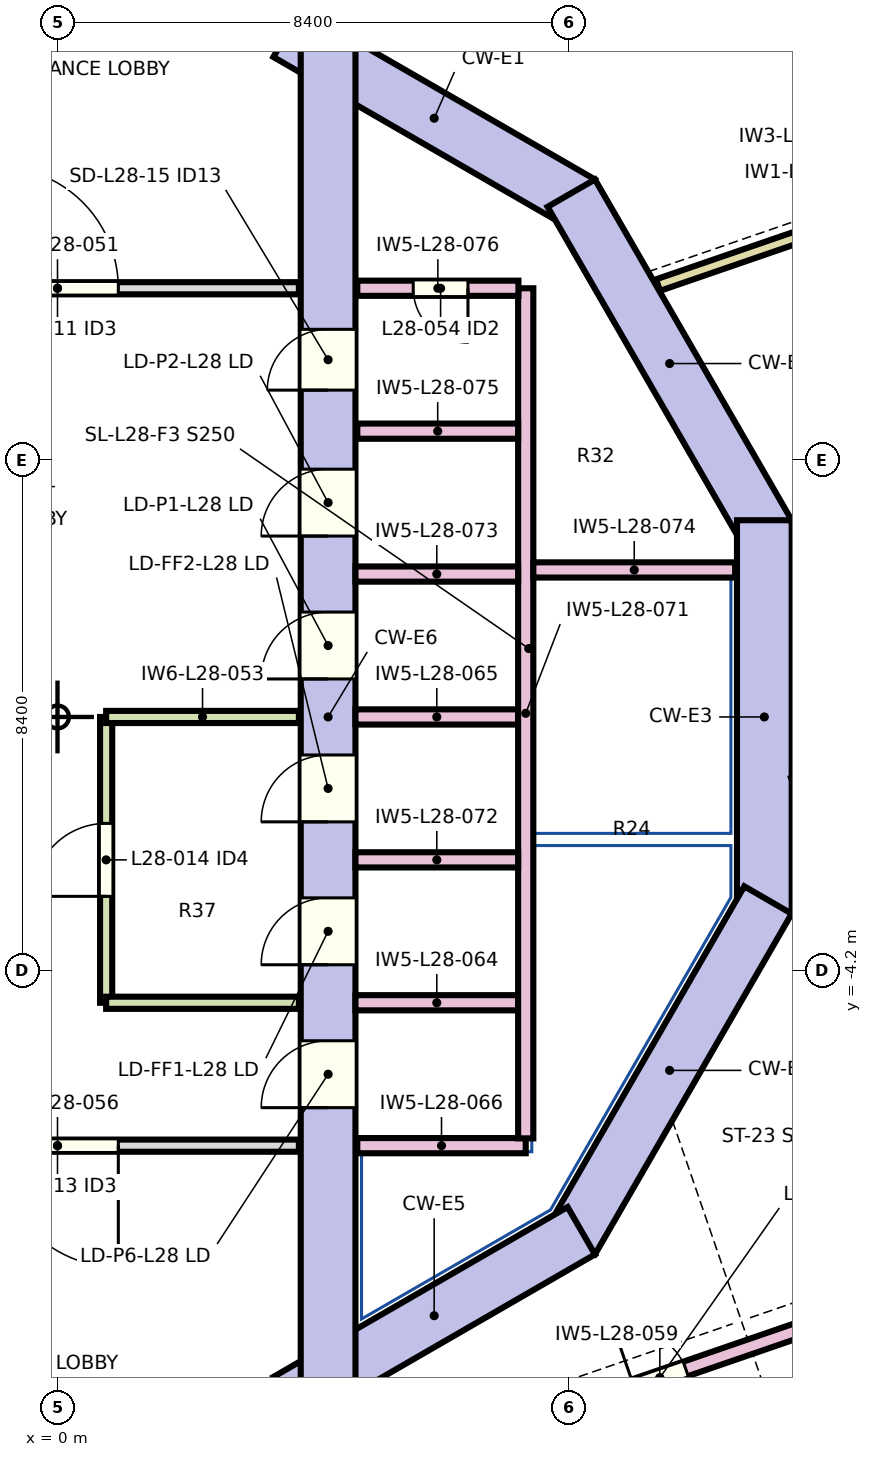
"""IFC4 building model, lengths in metres.
Left out: names, types, materials, properties, quantities, classifications, styles, units other than length and angle.
Written with IfcOpenShell. Run it as: python <this file> out.ifc"""

import sys

from ifc_helpers import new_model, si_unit, direction, frame, frame_2d, origin, place, context, subcontext, project, spatial, rectangle, extrude, element, fill, save


model = new_model("IFC4")
c1 = context("Model", 3, precision=1e-05, world=origin(), true_north=direction((0.0, 1.0)))
c2 = subcontext(c1, "Body", "Model", "MODEL_VIEW")
j1 = project(units=[si_unit("LENGTHUNIT", "METRE"), si_unit("PLANEANGLEUNIT", "RADIAN")], contexts=[c1])
p1 = place(None, origin())
s1 = spatial("IfcSite", under=j1, at=p1, CompositionType="ELEMENT")
p2 = place(p1, origin())
s2 = spatial("IfcBuilding", under=s1, at=p2, CompositionType="ELEMENT")
p3 = place(p2, frame((0.0, 0.0, 134.5)))
s3 = spatial("IfcBuildingStorey", under=s2, at=p3, CompositionType="ELEMENT", Elevation=134.5)
p4 = place(p3, frame((3.775, 11.243, 0.0), z_axis=(0.0, 0.0, 1.0), x_axis=(0.866026961591, -0.49999730179, 0.0)))
e1 = element("IfcWall", 1, at=p4, inside=s3, PredefinedType="SHEAR", context=c2, shape_type="SweptSolid", body=[
    extrude(rectangle(XDim=5.587, YDim=0.9, at=frame_2d((2.794, 0.0))), origin(), (0.0, 0.0, 1.0), 3.8),
])
p5 = place(p3, frame((8.449, 8.614, 0.0), z_axis=(0.0, 0.0, 1.0), x_axis=(0.499990282633, -0.866031014036, 0.0)))
e2 = element("IfcWall", 2, at=p5, inside=s3, PredefinedType="SHEAR", context=c2, shape_type="SweptSolid", body=[
    extrude(rectangle(XDim=6.47, YDim=0.9, at=frame_2d((3.235, 0.0))), origin(), (0.0, 0.0, 1.0), 3.8),
])
p6 = place(p3, frame((11.624, 3.235, 0.0), z_axis=(0.0, 0.0, 1.0), x_axis=(0.0, -1.0, 0.0)))
e3 = element("IfcWall", 3, at=p6, inside=s3, PredefinedType="SHEAR", context=c2, shape_type="SweptSolid", body=[
    extrude(rectangle(XDim=6.471, YDim=0.9, at=frame_2d((3.235, 0.0))), origin(), (0.0, 0.0, 1.0), 3.8),
])
p7 = place(p3, frame((11.684, -3.01, 0.0), z_axis=(0.0, 0.0, 1.0), x_axis=(-0.499990282633, -0.866031014036, 0.0)))
e4 = element("IfcWall", 4, at=p7, inside=s3, PredefinedType="SHEAR", context=c2, shape_type="SweptSolid", body=[
    extrude(rectangle(XDim=6.47, YDim=0.9, at=frame_2d((3.235, 0.0))), origin(), (0.0, 0.0, 1.0), 3.8),
])
p8 = place(p3, frame((8.614, -8.449, 0.0), z_axis=(0.0, 0.0, 1.0), x_axis=(-0.866026961591, -0.49999730179, 0.0)))
e5 = element("IfcWall", 5, at=p8, inside=s3, PredefinedType="SHEAR", context=c2, shape_type="SweptSolid", body=[
    extrude(rectangle(XDim=5.587, YDim=0.9, at=frame_2d((2.794, 0.0))), origin(), (0.0, 0.0, 1.0), 3.8),
])
p9 = place(p3, frame((4.45, -11.633, 0.0), z_axis=(0.0, 0.0, 1.0), x_axis=(0.0, 1.0, 0.0)))
e6 = element("IfcWall", 6, at=p9, inside=s3, PredefinedType="SHEAR", context=c2, shape_type="SweptSolid", body=[
    extrude(rectangle(XDim=23.265, YDim=0.9, at=frame_2d((11.633, 0.0))), origin(), (0.0, 0.0, 1.0), 3.8),
])
p10 = place(p9, frame((7.558, 0.0, 0.0)))
e7 = element("IfcOpeningElement", 7, at=p10, cuts=e6, PredefinedType="OPENING", context=c2, shape_type="SweptSolid", body=[
    extrude(rectangle(XDim=1.1, YDim=2.1, at=frame_2d((0.55, 1.05))), frame((0.0, 0.46, 0.0), z_axis=(0.0, -1.0, 0.0), x_axis=(1.0, 0.0, 0.0)), (0.0, 0.0, 1.0), 0.92),
])
p11 = place(p9, frame((9.907, 0.0, 0.0)))
e8 = element("IfcOpeningElement", 8, at=p11, cuts=e6, PredefinedType="OPENING", context=c2, shape_type="SweptSolid", body=[
    extrude(rectangle(XDim=1.1, YDim=2.1, at=frame_2d((0.55, 1.05))), frame((0.0, 0.46, 0.0), z_axis=(0.0, -1.0, 0.0), x_axis=(1.0, 0.0, 0.0)), (0.0, 0.0, 1.0), 0.92),
])
p12 = place(p9, frame((12.258, 0.0, 0.0)))
e9 = element("IfcOpeningElement", 9, at=p12, cuts=e6, PredefinedType="OPENING", context=c2, shape_type="SweptSolid", body=[
    extrude(rectangle(XDim=1.1, YDim=2.1, at=frame_2d((0.55, 1.05))), frame((0.0, 0.46, 0.0), z_axis=(0.0, -1.0, 0.0), x_axis=(1.0, 0.0, 0.0)), (0.0, 0.0, 1.0), 0.92),
])
p13 = place(p9, frame((14.607, 0.0, 0.0)))
e10 = element("IfcOpeningElement", 10, at=p13, cuts=e6, PredefinedType="OPENING", context=c2, shape_type="SweptSolid", body=[
    extrude(rectangle(XDim=1.1, YDim=2.1, at=frame_2d((0.55, 1.05))), frame((0.0, 0.46, 0.0), z_axis=(0.0, -1.0, 0.0), x_axis=(1.0, 0.0, 0.0)), (0.0, 0.0, 1.0), 0.92),
])
p14 = place(p9, frame((5.208, 0.0, 0.0)))
e11 = element("IfcOpeningElement", 11, at=p14, cuts=e6, PredefinedType="OPENING", context=c2, shape_type="SweptSolid", body=[
    extrude(rectangle(XDim=1.1, YDim=2.1, at=frame_2d((0.55, 1.05))), frame((0.0, 0.46, 0.0), z_axis=(0.0, -1.0, 0.0), x_axis=(1.0, 0.0, 0.0)), (0.0, 0.0, 1.0), 0.92),
])
p15 = place(p9, frame((17.008, 0.0, 0.0)))
e12 = element("IfcOpeningElement", 12, at=p15, cuts=e6, PredefinedType="OPENING", context=c2, shape_type="SweptSolid", body=[
    extrude(rectangle(XDim=1.0, YDim=2.1, at=frame_2d((0.5, 1.05))), frame((0.0, 0.46, 0.0), z_axis=(0.0, -1.0, 0.0), x_axis=(1.0, 0.0, 0.0)), (0.0, 0.0, 1.0), 0.92),
])
p16 = place(p3, frame((-12.586, -20.515, 0.0), z_axis=(0.0, 0.0, 1.0), x_axis=(0.945519939336, 0.325564193852, 0.0)))
e13 = element("IfcWall", 13, at=p16, inside=s3, PredefinedType="PARTITIONING", context=c2, shape_type="SweptSolid", body=[
    extrude(rectangle(XDim=37.28, YDim=0.2, at=frame_2d((18.64, 0.0))), origin(), (0.0, 0.0, 1.0), 3.55),
])
p17 = place(p16, frame((9.83, 0.0, 0.0)))
e14 = element("IfcOpeningElement", 14, at=p17, cuts=e13, PredefinedType="OPENING", context=c2, shape_type="SweptSolid", body=[
    extrude(rectangle(XDim=1.0, YDim=2.1, at=frame_2d((0.5, 1.05))), frame((0.0, 0.11, 0.0), z_axis=(0.0, -1.0, 0.0), x_axis=(1.0, 0.0, 0.0)), (0.0, 0.0, 1.0), 0.22),
])
p18 = place(p16, frame((18.93, 0.0, 0.0)))
e15 = element("IfcOpeningElement", 15, at=p18, cuts=e13, PredefinedType="OPENING", context=c2, shape_type="SweptSolid", body=[
    extrude(rectangle(XDim=1.0, YDim=2.1, at=frame_2d((0.5, 1.05))), frame((0.0, 0.11, 0.0), z_axis=(0.0, -1.0, 0.0), x_axis=(1.0, 0.0, 0.0)), (0.0, 0.0, 1.0), 0.22),
])
p19 = place(p16, frame((30.28, 0.0, 0.0)))
e16 = element("IfcOpeningElement", 16, at=p19, cuts=e13, PredefinedType="OPENING", context=c2, shape_type="SweptSolid", body=[
    extrude(rectangle(XDim=1.0, YDim=2.1, at=frame_2d((0.5, 1.05))), frame((0.0, 0.11, 0.0), z_axis=(0.0, -1.0, 0.0), x_axis=(1.0, 0.0, 0.0)), (0.0, 0.0, 1.0), 0.22),
])
p20 = place(p16, frame((0.13, 0.0, 0.0)))
e17 = element("IfcOpeningElement", 17, at=p20, cuts=e13, PredefinedType="OPENING", context=c2, shape_type="SweptSolid", body=[
    extrude(rectangle(XDim=1.0, YDim=2.1, at=frame_2d((0.5, 1.05))), frame((0.0, 0.11, 0.0), z_axis=(0.0, -1.0, 0.0), x_axis=(1.0, 0.0, 0.0)), (0.0, 0.0, 1.0), 0.22),
])
p21 = place(p16, frame((34.23, 0.0, 0.0)))
e18 = element("IfcOpeningElement", 18, at=p21, cuts=e13, PredefinedType="OPENING", context=c2, shape_type="SweptSolid", body=[
    extrude(rectangle(XDim=1.1, YDim=2.1, at=frame_2d((0.55, 1.05))), frame((0.0, 0.11, 0.0), z_axis=(0.0, -1.0, 0.0), x_axis=(1.0, 0.0, 0.0)), (0.0, 0.0, 1.0), 0.22),
])
p22 = place(p3, frame((-3.97, 7.05, 0.0), z_axis=(0.0, 0.0, 1.0), x_axis=(1.0, 0.0, 0.0)))
e19 = element("IfcWall", 19, at=p22, inside=s3, PredefinedType="PARTITIONING", context=c2, shape_type="SweptSolid", body=[
    extrude(rectangle(XDim=7.94, YDim=0.2, at=frame_2d((3.97, 0.0))), origin(), (0.0, 0.0, 1.0), 3.55),
])
p23 = place(p22, frame((2.97, 0.0, 0.0)))
e20 = element("IfcOpeningElement", 20, at=p23, cuts=e19, PredefinedType="OPENING", context=c2, shape_type="SweptSolid", body=[
    extrude(rectangle(XDim=2.0, YDim=2.1, at=frame_2d((1.0, 1.05))), frame((0.0, 0.11, 0.0), z_axis=(0.0, -1.0, 0.0), x_axis=(1.0, 0.0, 0.0)), (0.0, 0.0, 1.0), 0.22),
])
p24 = place(p3, frame((0.8, -4.7, 0.0), z_axis=(0.0, 0.0, 1.0), x_axis=(0.0, 1.0, 0.0)))
e21 = element("IfcWall", 21, at=p24, inside=s3, PredefinedType="SOLIDWALL", context=c2, shape_type="SweptSolid", body=[
    extrude(rectangle(XDim=4.7, YDim=0.2, at=frame_2d((2.35, 0.0))), origin(), (0.0, 0.0, 1.0), 3.55),
])
p25 = place(p24, frame((1.75, 0.0, 0.0)))
e22 = element("IfcOpeningElement", 22, at=p25, cuts=e21, PredefinedType="OPENING", context=c2, shape_type="SweptSolid", body=[
    extrude(rectangle(XDim=1.2, YDim=2.1, at=frame_2d((0.6, 1.05))), frame((0.0, 0.11, 0.0), z_axis=(0.0, -1.0, 0.0), x_axis=(1.0, 0.0, 0.0)), (0.0, 0.0, 1.0), 0.22),
])
p26 = place(p3, frame((0.8, 0.0, 0.0), z_axis=(0.0, 0.0, 1.0), x_axis=(1.0, 0.0, 0.0)))
e23 = element("IfcWall", 23, at=p26, inside=s3, PredefinedType="SOLIDWALL", context=c2, shape_type="SweptSolid", body=[
    extrude(rectangle(XDim=3.17, YDim=0.2, at=frame_2d((1.585, 0.0))), origin(), (0.0, 0.0, 1.0), 3.55),
])
p27 = place(p3, frame((3.97, -7.05, 0.0), z_axis=(0.0, 0.0, 1.0), x_axis=(-1.0, 0.0, 0.0)))
e24 = element("IfcWall", 24, at=p27, inside=s3, PredefinedType="PARTITIONING", context=c2, shape_type="SweptSolid", body=[
    extrude(rectangle(XDim=7.94, YDim=0.2, at=frame_2d((3.97, 0.0))), origin(), (0.0, 0.0, 1.0), 3.55),
])
p28 = place(p27, frame((2.97, 0.0, 0.0)))
e25 = element("IfcOpeningElement", 25, at=p28, cuts=e24, PredefinedType="OPENING", context=c2, shape_type="SweptSolid", body=[
    extrude(rectangle(XDim=2.0, YDim=2.1, at=frame_2d((1.0, 1.05))), frame((0.0, 0.11, 0.0), z_axis=(0.0, -1.0, 0.0), x_axis=(1.0, 0.0, 0.0)), (0.0, 0.0, 1.0), 0.22),
])
p29 = place(p3, frame((3.97, -4.7, 0.0), z_axis=(0.0, 0.0, 1.0), x_axis=(-1.0, 0.0, 0.0)))
e26 = element("IfcWall", 26, at=p29, inside=s3, PredefinedType="SOLIDWALL", context=c2, shape_type="SweptSolid", body=[
    extrude(rectangle(XDim=3.17, YDim=0.2, at=frame_2d((1.585, 0.0))), origin(), (0.0, 0.0, 1.0), 3.55),
])
p30 = place(p3, frame((4.0, -12.901, 0.0), z_axis=(0.0, 0.0, 1.0), x_axis=(0.945515789626, 0.325576245398, 0.0)))
e27 = element("IfcWall", 27, at=p30, inside=s3, PredefinedType="SOLIDWALL", context=c2, shape_type="SweptSolid", body=[
    extrude(rectangle(XDim=12.491, YDim=0.25, at=frame_2d((6.246, 0.0))), origin(), (0.0, 0.0, 1.0), 3.55),
])
p31 = place(p30, frame((0.175, 0.0, 0.0)))
e28 = element("IfcOpeningElement", 28, at=p31, cuts=e27, PredefinedType="OPENING", context=c2, shape_type="SweptSolid", body=[
    extrude(rectangle(XDim=0.9, YDim=2.1, at=frame_2d((0.45, 1.05))), frame((0.0, 0.135, 0.0), z_axis=(0.0, -1.0, 0.0), x_axis=(1.0, 0.0, 0.0)), (0.0, 0.0, 1.0), 0.27),
])
p32 = place(p30, frame((5.796, 0.0, 0.0)))
e29 = element("IfcOpeningElement", 29, at=p32, cuts=e27, PredefinedType="OPENING", context=c2, shape_type="SweptSolid", body=[
    extrude(rectangle(XDim=0.9, YDim=2.1, at=frame_2d((0.45, 1.05))), frame((0.0, 0.135, 0.0), z_axis=(0.0, -1.0, 0.0), x_axis=(1.0, 0.0, 0.0)), (0.0, 0.0, 1.0), 0.27),
])
p33 = place(p3, frame((4.599, 15.862, 0.0), z_axis=(0.0, 0.0, 1.0), x_axis=(-0.94551912499, -0.325566558907, 0.0)))
e30 = element("IfcWall", 30, at=p33, inside=s3, PredefinedType="PARTITIONING", context=c2, shape_type="SweptSolid", body=[
    extrude(rectangle(XDim=26.293, YDim=0.2, at=frame_2d((13.146, 0.0))), origin(), (0.0, 0.0, 1.0), 3.55),
])
p34 = place(p33, frame((10.81, 0.0, 0.0)))
e31 = element("IfcOpeningElement", 31, at=p34, cuts=e30, PredefinedType="OPENING", context=c2, shape_type="SweptSolid", body=[
    extrude(rectangle(XDim=0.9, YDim=2.1, at=frame_2d((0.45, 1.05))), frame((0.0, 0.11, 0.0), z_axis=(0.0, -1.0, 0.0), x_axis=(1.0, 0.0, 0.0)), (0.0, 0.0, 1.0), 0.22),
])
p35 = place(p33, frame((3.865, 0.0, 0.0)))
e32 = element("IfcOpeningElement", 32, at=p35, cuts=e30, PredefinedType="OPENING", context=c2, shape_type="SweptSolid", body=[
    extrude(rectangle(XDim=2.0, YDim=2.1, at=frame_2d((1.0, 1.05))), frame((0.0, 0.11, 0.0), z_axis=(0.0, -1.0, 0.0), x_axis=(1.0, 0.0, 0.0)), (0.0, 0.0, 1.0), 0.22),
])
for number, where, z_axis, x_axis in (
    (33, (4.9, -4.7, 0.0), (0.0, 0.0, 1.0), (1.0, 0.0, 0.0)),
    (34, (4.9, 0.0, 0.0), (0.0, 0.0, 1.0), (1.0, 0.0, 0.0)),
):
    element("IfcWall", number, at=place(p3, frame(where, z_axis=z_axis, x_axis=x_axis)), inside=s3, PredefinedType="SOLIDWALL", context=c2, shape_type="SweptSolid", body=[
        extrude(rectangle(XDim=2.675, YDim=0.25, at=frame_2d((1.337, 0.0))), origin(), (0.0, 0.0, 1.0), 3.55),
    ])
p36 = place(p3, frame((4.93, -7.05, 0.0), z_axis=(0.0, 0.0, 1.0), x_axis=(1.0, 0.0, 0.0)))
e35 = element("IfcWall", 35, at=p36, inside=s3, PredefinedType="SOLIDWALL", context=c2, shape_type="SweptSolid", body=[
    extrude(rectangle(XDim=2.77, YDim=0.25, at=frame_2d((1.385, 0.0))), origin(), (0.0, 0.0, 1.0), 3.55),
])
p37 = place(p3, frame((7.7, -6.93, 0.0), z_axis=(0.0, 0.0, 1.0), x_axis=(0.0, 1.0, 0.0)))
e36 = element("IfcWall", 36, at=p37, inside=s3, PredefinedType="SOLIDWALL", context=c2, shape_type="SweptSolid", body=[
    extrude(rectangle(XDim=13.98, YDim=0.25, at=frame_2d((6.99, 0.0))), origin(), (0.0, 0.0, 1.0), 3.55),
])
for number, where, z_axis, x_axis in (
    (37, (7.575, -2.35, 0.0), (0.0, 0.0, 1.0), (-1.0, 0.0, 0.0)),
    (38, (7.575, 2.35, 0.0), (0.0, 0.0, 1.0), (-1.0, 0.0, 0.0)),
):
    element("IfcWall", number, at=place(p3, frame(where, z_axis=z_axis, x_axis=x_axis)), inside=s3, PredefinedType="SOLIDWALL", context=c2, shape_type="SweptSolid", body=[
        extrude(rectangle(XDim=2.675, YDim=0.25, at=frame_2d((1.337, 0.0))), origin(), (0.0, 0.0, 1.0), 3.55),
    ])
p38 = place(p3, frame((7.825, 2.418, 0.0), z_axis=(0.0, 0.0, 1.0), x_axis=(1.0, 0.0, 0.0)))
e39 = element("IfcWall", 39, at=p38, inside=s3, PredefinedType="SOLIDWALL", context=c2, shape_type="SweptSolid", body=[
    extrude(rectangle(XDim=3.319, YDim=0.25, at=frame_2d((1.66, 0.0))), origin(), (0.0, 0.0, 1.0), 3.55),
])
p39 = place(p3, frame((7.575, 4.7, 0.0), z_axis=(0.0, 0.0, 1.0), x_axis=(-1.0, 0.0, 0.0)))
e40 = element("IfcWall", 40, at=p39, inside=s3, PredefinedType="SOLIDWALL", context=c2, shape_type="SweptSolid", body=[
    extrude(rectangle(XDim=2.645, YDim=0.25, at=frame_2d((1.323, 0.0))), origin(), (0.0, 0.0, 1.0), 3.55),
])
p40 = place(p3, frame((7.58, 7.05, 0.0), z_axis=(0.0, 0.0, 1.0), x_axis=(-1.0, 0.0, 0.0)))
e41 = element("IfcWall", 41, at=p40, inside=s3, PredefinedType="SOLIDWALL", context=c2, shape_type="SweptSolid", body=[
    extrude(rectangle(XDim=2.65, YDim=0.25, at=frame_2d((1.325, 0.0))), origin(), (0.0, 0.0, 1.0), 3.55),
])
p41 = place(p40, frame((0.83, 0.0, 0.0)))
e42 = element("IfcOpeningElement", 42, at=p41, cuts=e41, PredefinedType="OPENING", context=c2, shape_type="SweptSolid", body=[
    extrude(rectangle(XDim=0.9, YDim=2.1, at=frame_2d((0.45, 1.05))), frame((0.0, 0.135, 0.0), z_axis=(0.0, -1.0, 0.0), x_axis=(1.0, 0.0, 0.0)), (0.0, 0.0, 1.0), 0.27),
])
p42 = place(p3, frame((12.104, -1.12, 0.0), z_axis=(0.0, 0.0, 1.0), x_axis=(0.945524886184, 0.325549826612, 0.0)))
e43 = element("IfcWall", 43, at=p42, inside=s3, PredefinedType="SOLIDWALL", context=c2, shape_type="SweptSolid", body=[
    extrude(rectangle(XDim=5.82, YDim=0.25, at=frame_2d((2.91, 0.0))), origin(), (0.0, 0.0, 1.0), 3.55),
])
p43 = place(p3, frame((14.745, 8.779, 0.0), z_axis=(0.0, 0.0, 1.0), x_axis=(-0.94551748964, -0.325571308296, 0.0)))
e44 = element("IfcWall", 44, at=p43, inside=s3, PredefinedType="PARTITIONING", context=c2, shape_type="SweptSolid", body=[
    extrude(rectangle(XDim=5.149, YDim=0.2, at=frame_2d((2.575, 0.0))), origin(), (0.0, 0.0, 1.0), 3.55),
])
p44 = place(p3, frame((17.562, 0.907, 0.0), z_axis=(0.0, 0.0, 1.0), x_axis=(-0.325566240089, 0.945519234767, 0.0)))
e45 = element("IfcWall", 45, at=p44, inside=s3, PredefinedType="PARTITIONING", context=c2, shape_type="SweptSolid", body=[
    extrude(rectangle(XDim=18.26, YDim=0.2, at=frame_2d((9.13, 0.0))), origin(), (0.0, 0.0, 1.0), 3.55),
])
p45 = place(p44, frame((8.593, 0.0, 0.0)))
e46 = element("IfcOpeningElement", 46, at=p45, cuts=e45, PredefinedType="OPENING", context=c2, shape_type="SweptSolid", body=[
    extrude(rectangle(XDim=0.9, YDim=2.1, at=frame_2d((0.45, 1.05))), frame((0.0, 0.11, 0.0), z_axis=(0.0, -1.0, 0.0), x_axis=(1.0, 0.0, 0.0)), (0.0, 0.0, 1.0), 0.22),
])
p46 = place(p44, frame((5.785, 0.0, 0.0)))
e47 = element("IfcOpeningElement", 47, at=p46, cuts=e45, PredefinedType="OPENING", context=c2, shape_type="SweptSolid", body=[
    extrude(rectangle(XDim=0.9, YDim=2.1, at=frame_2d((0.45, 1.05))), frame((0.0, 0.11, 0.0), z_axis=(0.0, -1.0, 0.0), x_axis=(1.0, 0.0, 0.0)), (0.0, 0.0, 1.0), 0.22),
])
p47 = place(p23, origin())
e48 = element("IfcDoor", 48, at=p47, inside=s3, OperationType="NOTDEFINED", PredefinedType="DOOR", context=c2, shape_type="SweptSolid", body=[
    extrude(rectangle(XDim=2.0, YDim=2.1, at=frame_2d((1.0, 1.05))), frame((0.0, 0.025, 0.0), z_axis=(0.0, -1.0, 0.0), x_axis=(1.0, 0.0, 0.0)), (0.0, 0.0, 1.0), 0.05),
])
fill(e20, e48)
p48 = place(p28, origin())
e49 = element("IfcDoor", 49, at=p48, inside=s3, OperationType="NOTDEFINED", PredefinedType="DOOR", context=c2, shape_type="SweptSolid", body=[
    extrude(rectangle(XDim=2.0, YDim=2.1, at=frame_2d((1.0, 1.05))), frame((0.0, 0.025, 0.0), z_axis=(0.0, -1.0, 0.0), x_axis=(1.0, 0.0, 0.0)), (0.0, 0.0, 1.0), 0.05),
])
fill(e25, e49)
p49 = place(p25, origin())
e50 = element("IfcDoor", 50, at=p49, inside=s3, OperationType="NOTDEFINED", PredefinedType="DOOR", context=c2, shape_type="SweptSolid", body=[
    extrude(rectangle(XDim=1.2, YDim=2.1, at=frame_2d((0.6, 1.05))), frame((0.0, 0.025, 0.0), z_axis=(0.0, -1.0, 0.0), x_axis=(1.0, 0.0, 0.0)), (0.0, 0.0, 1.0), 0.05),
])
fill(e22, e50)
p50 = place(p32, origin())
e51 = element("IfcDoor", 51, at=p50, inside=s3, OperationType="NOTDEFINED", PredefinedType="DOOR", context=c2, shape_type="SweptSolid", body=[
    extrude(rectangle(XDim=0.9, YDim=2.1, at=frame_2d((0.45, 1.05))), frame((0.0, 0.025, 0.0), z_axis=(0.0, -1.0, 0.0), x_axis=(1.0, 0.0, 0.0)), (0.0, 0.0, 1.0), 0.05),
])
fill(e29, e51)
p51 = place(p41, origin())
e52 = element("IfcDoor", 52, at=p51, inside=s3, OperationType="NOTDEFINED", PredefinedType="DOOR", context=c2, shape_type="SweptSolid", body=[
    extrude(rectangle(XDim=0.9, YDim=2.1, at=frame_2d((0.45, 1.05))), frame((0.0, 0.025, 0.0), z_axis=(0.0, -1.0, 0.0), x_axis=(1.0, 0.0, 0.0)), (0.0, 0.0, 1.0), 0.05),
])
fill(e42, e52)
p52 = place(p10, origin())
e53 = element("IfcDoor", 53, at=p52, inside=s3, OperationType="SLIDING_TO_LEFT", PredefinedType="DOOR", context=c2, shape_type="SweptSolid", body=[
    extrude(rectangle(XDim=1.1, YDim=2.1, at=frame_2d((0.55, 1.05))), frame((0.0, 0.025, 0.0), z_axis=(0.0, -1.0, 0.0), x_axis=(1.0, 0.0, 0.0)), (0.0, 0.0, 1.0), 0.05),
])
fill(e7, e53)
p53 = place(p11, origin())
e54 = element("IfcDoor", 54, at=p53, inside=s3, OperationType="SLIDING_TO_LEFT", PredefinedType="DOOR", context=c2, shape_type="SweptSolid", body=[
    extrude(rectangle(XDim=1.1, YDim=2.1, at=frame_2d((0.55, 1.05))), frame((0.0, 0.025, 0.0), z_axis=(0.0, -1.0, 0.0), x_axis=(1.0, 0.0, 0.0)), (0.0, 0.0, 1.0), 0.05),
])
fill(e8, e54)
p54 = place(p12, origin())
e55 = element("IfcDoor", 55, at=p54, inside=s3, OperationType="SLIDING_TO_LEFT", PredefinedType="DOOR", context=c2, shape_type="SweptSolid", body=[
    extrude(rectangle(XDim=1.1, YDim=2.1, at=frame_2d((0.55, 1.05))), frame((0.0, 0.025, 0.0), z_axis=(0.0, -1.0, 0.0), x_axis=(1.0, 0.0, 0.0)), (0.0, 0.0, 1.0), 0.05),
])
fill(e9, e55)
p55 = place(p13, origin())
e56 = element("IfcDoor", 56, at=p55, inside=s3, OperationType="SLIDING_TO_LEFT", PredefinedType="DOOR", context=c2, shape_type="SweptSolid", body=[
    extrude(rectangle(XDim=1.1, YDim=2.1, at=frame_2d((0.55, 1.05))), frame((0.0, 0.025, 0.0), z_axis=(0.0, -1.0, 0.0), x_axis=(1.0, 0.0, 0.0)), (0.0, 0.0, 1.0), 0.05),
])
fill(e10, e56)
p56 = place(p14, origin())
e57 = element("IfcDoor", 57, at=p56, inside=s3, OperationType="SLIDING_TO_LEFT", PredefinedType="DOOR", context=c2, shape_type="SweptSolid", body=[
    extrude(rectangle(XDim=1.1, YDim=2.1, at=frame_2d((0.55, 1.05))), frame((0.0, 0.025, 0.0), z_axis=(0.0, -1.0, 0.0), x_axis=(1.0, 0.0, 0.0)), (0.0, 0.0, 1.0), 0.05),
])
fill(e11, e57)
p57 = place(p15, origin())
e58 = element("IfcDoor", 58, at=p57, inside=s3, OperationType="NOTDEFINED", PredefinedType="DOOR", context=c2, shape_type="SweptSolid", body=[
    extrude(rectangle(XDim=1.0, YDim=2.1, at=frame_2d((0.5, 1.05))), frame((0.0, 0.025, 0.0), z_axis=(0.0, -1.0, 0.0), x_axis=(1.0, 0.0, 0.0)), (0.0, 0.0, 1.0), 0.05),
])
fill(e12, e58)
save(model, sys.argv[1])
